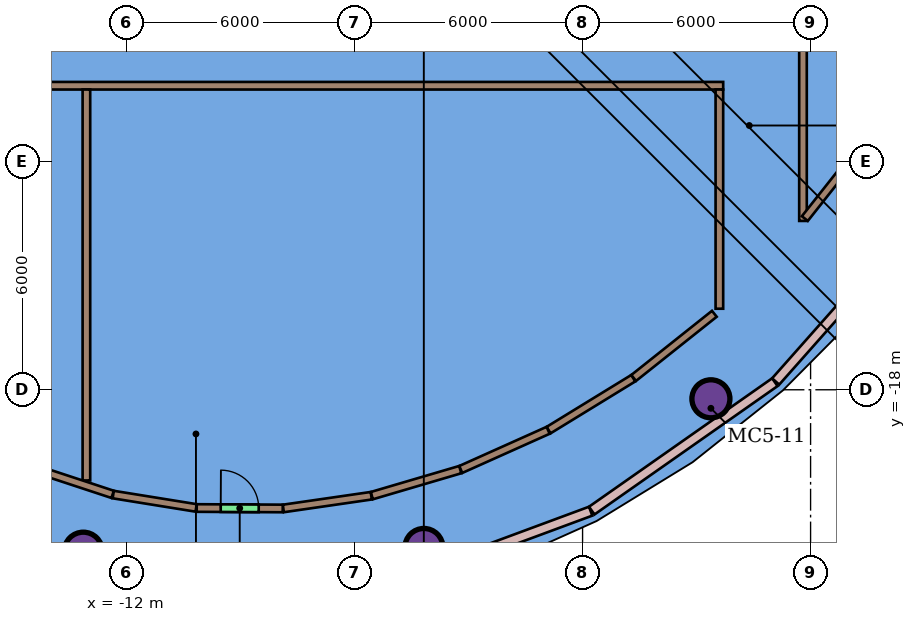
"""IFC4 building model, lengths in metres.
Left out: names, types, materials, properties, quantities, classifications, styles, units other than length and angle.
Written with IfcOpenShell. Run it as: python <this file> out.ifc"""

import sys

from ifc_helpers import new_model, si_unit, direction, frame, frame_2d, origin, origin_2d, place, context, subcontext, project, spatial, rectangle, hollow_circle, extrude, element, fill, save


model = new_model("IFC4")
c1 = context("Model", 3, precision=1e-05, world=origin(), true_north=direction((0.0, 1.0)))
c2 = subcontext(c1, "Body", "Model", "MODEL_VIEW")
j1 = project(units=[si_unit("LENGTHUNIT", "METRE"), si_unit("PLANEANGLEUNIT", "RADIAN")], contexts=[c1])
p1 = place(None, origin())
s1 = spatial("IfcSite", under=j1, at=p1, CompositionType="ELEMENT")
p2 = place(p1, origin())
s2 = spatial("IfcBuilding", under=s1, at=p2, CompositionType="ELEMENT")
p3 = place(p2, frame((0.0, 0.0, 304.5)))
s3 = spatial("IfcBuildingStorey", under=s2, at=p3, CompositionType="ELEMENT", Elevation=304.5)
for number, where, z_axis, x_axis in (
    (1, (-13.138, -22.247, 0.0), (0.0, 0.0, 1.0), (1.0, 0.0, 0.0)),
    (2, (-4.175, -22.149, 0.0), (0.0, 0.0, 1.0), (1.0, 0.0, 0.0)),
    (3, (3.377, -18.238, 0.0), (0.0, 0.0, 1.0), (1.0, 0.0, 0.0)),
):
    element("IfcColumn", number, at=place(p3, frame(where, z_axis=z_axis, x_axis=x_axis)), inside=s3, PredefinedType="COLUMN", context=c2, shape_type="SweptSolid", body=[
        extrude(hollow_circle(Radius=0.5, WallThickness=0.04, at=origin_2d()), origin(), (0.0, 0.0, 1.0), 4.0),
    ])
p4 = place(p3, frame((5.8, -13.558, 0.0), z_axis=(0.0, 0.0, 1.0), x_axis=(0.0, 1.0, 0.0)))
e4 = element("IfcWall", 4, at=p4, inside=s3, PredefinedType="PARTITIONING", context=c2, shape_type="SweptSolid", body=[
    extrude(rectangle(XDim=23.658, YDim=0.2, at=frame_2d((11.829, 0.0))), origin(), (0.0, 0.0, 1.0), 3.65),
])
p5 = place(p3, frame((-17.7, -10.0, 0.0), z_axis=(0.0, 0.0, 1.0), x_axis=(1.0, 0.0, 0.0)))
e5 = element("IfcWall", 5, at=p5, inside=s3, PredefinedType="PARTITIONING", context=c2, shape_type="SweptSolid", body=[
    extrude(rectangle(XDim=21.4, YDim=0.2, at=frame_2d((10.7, 0.0))), origin(), (0.0, 0.0, 1.0), 3.65),
])
p6 = place(p3, frame((3.6, -15.867, 0.0), z_axis=(0.0, 0.0, 1.0), x_axis=(0.0, 1.0, 0.0)))
e6 = element("IfcWall", 6, at=p6, inside=s3, PredefinedType="PARTITIONING", context=c2, shape_type="SweptSolid", body=[
    extrude(rectangle(XDim=5.767, YDim=0.2, at=frame_2d((2.884, 0.0))), origin(), (0.0, 0.0, 1.0), 3.65),
])
p7 = place(p3, frame((5.849, -13.496, 0.0), z_axis=(0.0, 0.0, 1.0), x_axis=(0.620321195124, 0.784347891487, 0.0)))
e7 = element("IfcWall", 7, at=p7, inside=s3, PredefinedType="PARTITIONING", context=c2, shape_type="SweptSolid", body=[
    extrude(rectangle(XDim=2.163, YDim=0.2, at=frame_2d((1.081, 0.0))), origin(), (0.0, 0.0, 1.0), 3.65),
])
p8 = place(p3, frame((-13.056, -20.387, 0.0), z_axis=(0.0, 0.0, 1.0), x_axis=(0.0, 1.0, 0.0)))
e8 = element("IfcWall", 8, at=p8, inside=s3, PredefinedType="PARTITIONING", context=c2, shape_type="SweptSolid", body=[
    extrude(rectangle(XDim=10.287, YDim=0.2, at=frame_2d((5.143, 0.0))), origin(), (0.0, 0.0, 1.0), 3.65),
])
p9 = place(p3, frame((-14.437, -20.07, 0.0), z_axis=(0.0, 0.0, 1.0), x_axis=(0.949852302688, -0.312698901627, 0.0)))
e9 = element("IfcWall", 9, at=p9, inside=s3, PredefinedType="PARTITIONING", context=c2, shape_type="SweptSolid", body=[
    extrude(rectangle(XDim=2.181, YDim=0.2, at=frame_2d((1.09, 0.0))), origin(), (0.0, 0.0, 1.0), 3.65),
])
p10 = place(p3, frame((-0.894, -19.061, 0.0), z_axis=(0.0, 0.0, 1.0), x_axis=(0.852667029926, 0.522454721557, 0.0)))
e10 = element("IfcWall", 10, at=p10, inside=s3, PredefinedType="PARTITIONING", context=c2, shape_type="SweptSolid", body=[
    extrude(rectangle(XDim=2.614, YDim=0.2, at=frame_2d((1.307, 0.0))), origin(), (0.0, 0.0, 1.0), 3.65),
])
p11 = place(p3, frame((-3.206, -20.097, 0.0), z_axis=(0.0, 0.0, 1.0), x_axis=(0.912552955942, 0.408958558538, 0.0)))
e11 = element("IfcWall", 11, at=p11, inside=s3, PredefinedType="PARTITIONING", context=c2, shape_type="SweptSolid", body=[
    extrude(rectangle(XDim=2.521, YDim=0.2, at=frame_2d((1.26, 0.0))), origin(), (0.0, 0.0, 1.0), 3.65),
])
p12 = place(p3, frame((-5.547, -20.786, 0.0), z_axis=(0.0, 0.0, 1.0), x_axis=(0.95934146389, 0.28224803925, 0.0)))
e12 = element("IfcWall", 12, at=p12, inside=s3, PredefinedType="PARTITIONING", context=c2, shape_type="SweptSolid", body=[
    extrude(rectangle(XDim=2.426, YDim=0.2, at=frame_2d((1.213, 0.0))), origin(), (0.0, 0.0, 1.0), 3.65),
])
p13 = place(p3, frame((-7.875, -21.123, 0.0), z_axis=(0.0, 0.0, 1.0), x_axis=(0.989671979467, 0.143350525141, 0.0)))
e13 = element("IfcWall", 13, at=p13, inside=s3, PredefinedType="PARTITIONING", context=c2, shape_type="SweptSolid", body=[
    extrude(rectangle(XDim=2.338, YDim=0.2, at=frame_2d((1.169, 0.0))), origin(), (0.0, 0.0, 1.0), 3.65),
])
p14 = place(p3, frame((-10.154, -21.111, 0.0), z_axis=(0.0, 0.0, 1.0), x_axis=(0.999986603133, -0.005176248997, 0.0)))
e14 = element("IfcWall", 14, at=p14, inside=s3, PredefinedType="PARTITIONING", context=c2, shape_type="SweptSolid", body=[
    extrude(rectangle(XDim=2.264, YDim=0.2, at=frame_2d((1.132, 0.0))), origin(), (0.0, 0.0, 1.0), 3.65),
])
p15 = place(p14, frame((0.632, 0.0, 0.0)))
e15 = element("IfcOpeningElement", 15, at=p15, cuts=e14, PredefinedType="OPENING", context=c2, shape_type="SweptSolid", body=[
    extrude(rectangle(XDim=1.0, YDim=2.1, at=frame_2d((0.5, 1.05))), frame((0.0, 0.11, 0.0), z_axis=(0.0, -1.0, 0.0), x_axis=(1.0, 0.0, 0.0)), (0.0, 0.0, 1.0), 0.22),
])
p16 = place(p3, frame((-12.35, -20.757, 0.0), z_axis=(0.0, 0.0, 1.0), x_axis=(0.987257926423, -0.159128208423, 0.0)))
e16 = element("IfcWall", 16, at=p16, inside=s3, PredefinedType="PARTITIONING", context=c2, shape_type="SweptSolid", body=[
    extrude(rectangle(XDim=2.209, YDim=0.2, at=frame_2d((1.104, 0.0))), origin(), (0.0, 0.0, 1.0), 3.65),
])
p17 = place(p3, frame((1.345, -17.689, 0.0), z_axis=(0.0, 0.0, 1.0), x_axis=(0.782665833332, 0.62244212047, 0.0)))
e17 = element("IfcWall", 17, at=p17, inside=s3, PredefinedType="PARTITIONING", context=c2, shape_type="SweptSolid", body=[
    extrude(rectangle(XDim=2.712, YDim=0.2, at=frame_2d((1.356, 0.0))), origin(), (0.0, 0.0, 1.0), 3.65),
])
p18 = place(p3, frame((-5.017, -23.131, 0.0), z_axis=(0.0, 0.0, 1.0), x_axis=(0.937764073403, 0.34727300879, 0.0)))
e18 = element("IfcWall", 18, at=p18, inside=s3, PredefinedType="SOLIDWALL", context=c2, shape_type="SweptSolid", body=[
    extrude(rectangle(XDim=5.577, YDim=0.25, at=frame_2d((2.789, 0.0))), origin(), (0.0, 0.0, 1.0), 3.7),
])
p19 = place(p3, frame((0.241, -21.18, 0.0), z_axis=(0.0, 0.0, 1.0), x_axis=(0.818761962214, 0.574133128492, 0.0)))
e19 = element("IfcWall", 19, at=p19, inside=s3, PredefinedType="SOLIDWALL", context=c2, shape_type="SweptSolid", body=[
    extrude(rectangle(XDim=5.885, YDim=0.25, at=frame_2d((2.943, 0.0))), origin(), (0.0, 0.0, 1.0), 3.7),
])
p20 = place(p3, frame((5.081, -17.781, 0.0), z_axis=(0.0, 0.0, 1.0), x_axis=(0.663232601491, 0.748413332537, 0.0)))
e20 = element("IfcWall", 20, at=p20, inside=s3, PredefinedType="SOLIDWALL", context=c2, shape_type="SweptSolid", body=[
    extrude(rectangle(XDim=6.139, YDim=0.25, at=frame_2d((3.07, 0.0))), origin(), (0.0, 0.0, 1.0), 3.7),
])
p21 = place(p15, origin())
e21 = element("IfcDoor", 21, at=p21, inside=s3, OperationType="SINGLE_SWING_LEFT", PredefinedType="DOOR", context=c2, shape_type="SweptSolid", body=[
    extrude(rectangle(XDim=1.0, YDim=2.1, at=frame_2d((0.5, 1.05))), frame((0.0, 0.025, 0.0), z_axis=(0.0, -1.0, 0.0), x_axis=(1.0, 0.0, 0.0)), (0.0, 0.0, 1.0), 0.05),
])
fill(e15, e21)
save(model, sys.argv[1])
